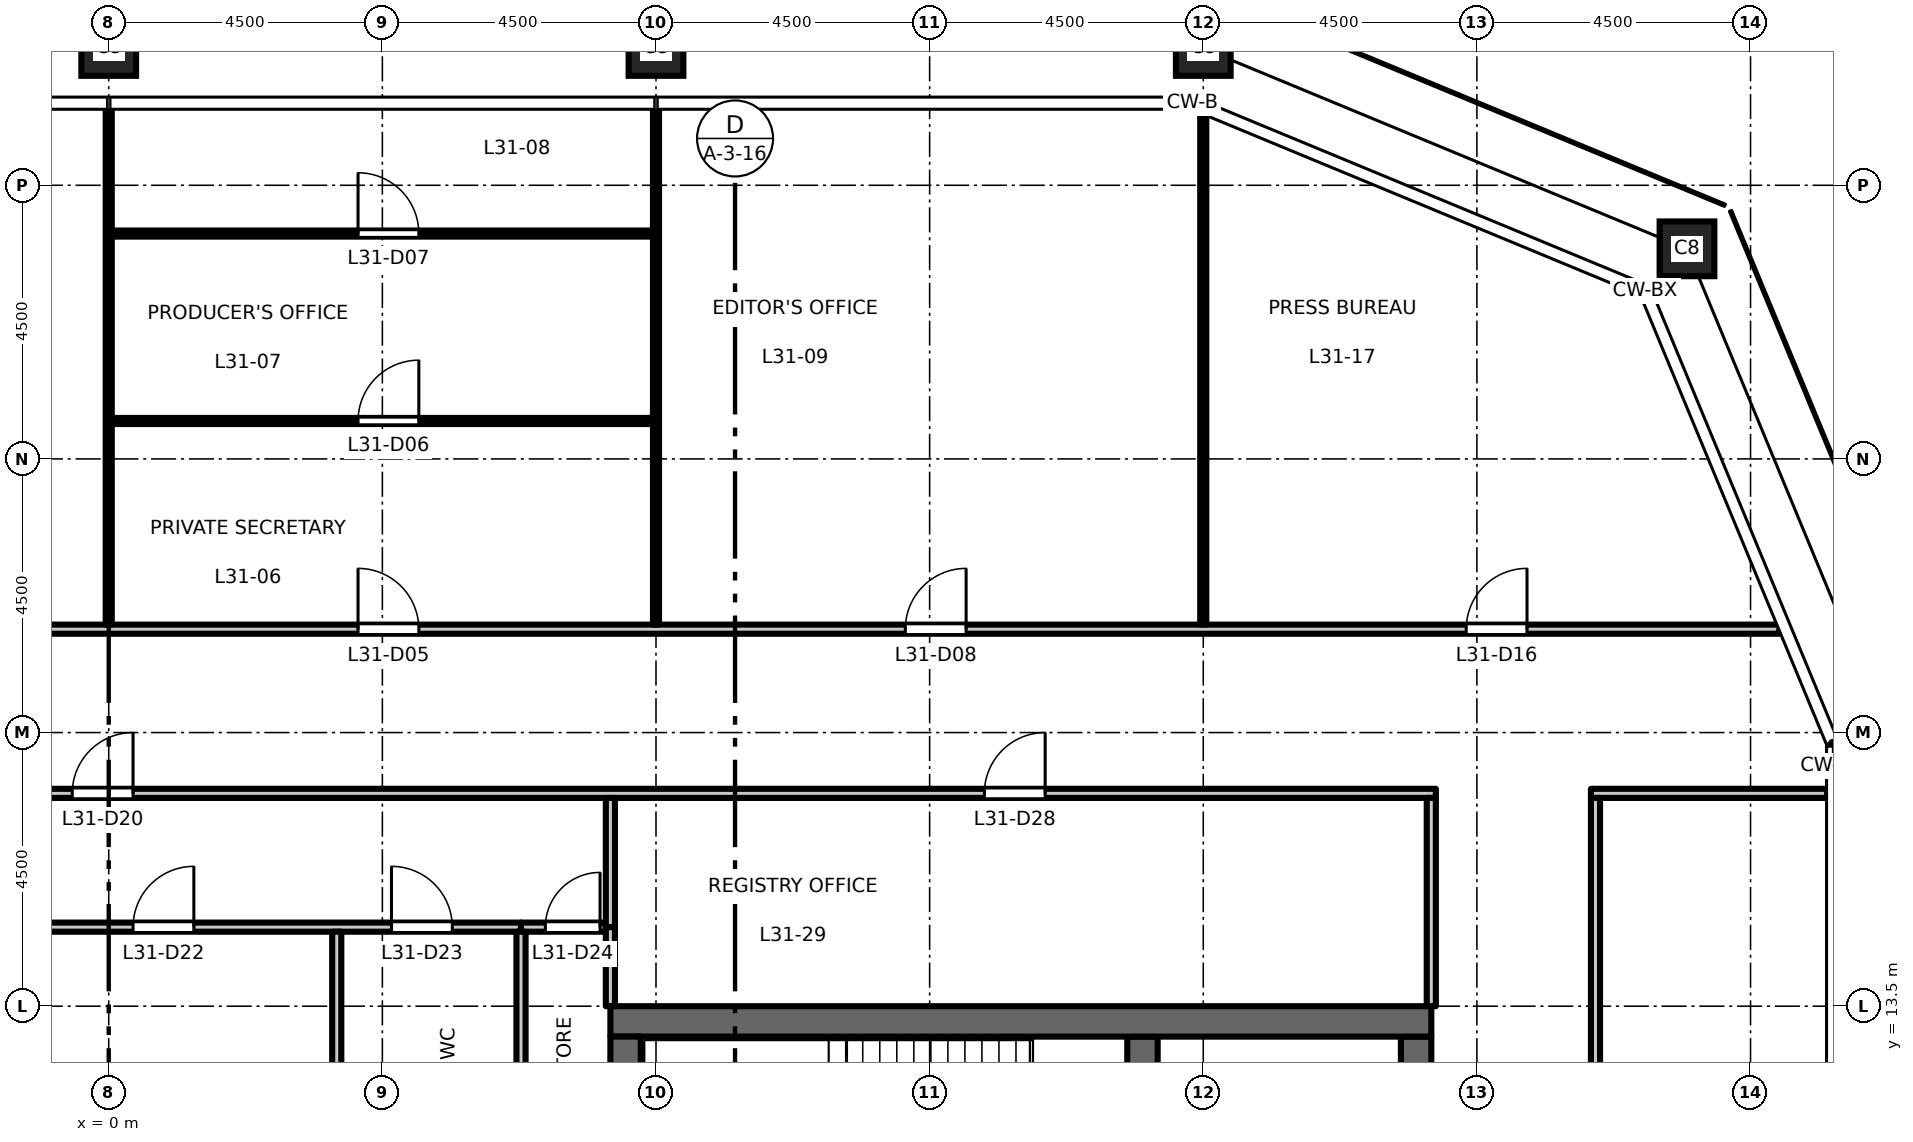
"""IFC4 building model, lengths in metres.
Left out: names, types, materials, properties, quantities, classifications, styles, units other than length and angle.
Written with IfcOpenShell. Run it as: python <this file> out.ifc"""

import sys

from ifc_helpers import new_model, si_unit, direction, frame, frame_2d, origin, origin_2d, place, context, subcontext, project, spatial, rectangle, hollow_rectangle, extrude, element, fill, save


model = new_model("IFC4")
c1 = context("Model", 3, precision=1e-05, world=origin(), true_north=direction((0.0, 1.0)))
c2 = subcontext(c1, "Body", "Model", "MODEL_VIEW")
j1 = project(units=[si_unit("LENGTHUNIT", "METRE"), si_unit("PLANEANGLEUNIT", "RADIAN")], contexts=[c1])
p1 = place(None, origin())
s1 = spatial("IfcSite", under=j1, at=p1, CompositionType="ELEMENT")
p2 = place(p1, origin())
s2 = spatial("IfcBuilding", under=s1, at=p2, CompositionType="ELEMENT")
p3 = place(p2, frame((0.0, 0.0, 145.2)))
s3 = spatial("IfcBuildingStorey", under=s2, at=p3, CompositionType="ELEMENT", Elevation=145.2)
for number, where, z_axis, x_axis in (
    (1, (25.955, 25.955, 0.0), (0.0, 0.0, 1.0), (1.0, 0.0, 0.0)),
    (2, (18.0, 29.25, 0.0), (0.0, 0.0, 1.0), (1.0, 0.0, 0.0)),
    (3, (9.0, 29.25, 0.0), (0.0, 0.0, 1.0), (1.0, 0.0, 0.0)),
    (4, (0.0, 29.25, 0.0), (0.0, 0.0, 1.0), (1.0, 0.0, 0.0)),
):
    element("IfcColumn", number, at=place(p3, frame(where, z_axis=z_axis, x_axis=x_axis)), inside=s3, PredefinedType="COLUMN", context=c2, shape_type="SweptSolid", body=[
        extrude(hollow_rectangle(XDim=0.9, YDim=0.9, WallThickness=0.05, at=origin_2d()), origin(), (0.0, 0.0, 1.0), 4.5),
    ])
p4 = place(p3, frame((21.5, -13.0, 0.0), z_axis=(0.0, 0.0, 1.0), x_axis=(0.0, 1.0, 0.0)))
e5 = element("IfcWall", 5, at=p4, inside=s3, PredefinedType="SHEAR", context=c2, shape_type="SweptSolid", body=[
    extrude(rectangle(XDim=26.0, YDim=0.5, at=frame_2d((13.0, 0.0))), origin(), (0.0, 0.0, 1.0), 4.35),
])
p5 = place(p4, frame((16.825, 0.0, 0.0)))
e6 = element("IfcOpeningElement", 6, at=p5, cuts=e5, PredefinedType="OPENING", context=c2, shape_type="SweptSolid", body=[
    extrude(rectangle(XDim=1.8, YDim=2.1, at=frame_2d((0.9, 1.05))), frame((0.0, 0.26, 0.0), z_axis=(0.0, -1.0, 0.0), x_axis=(1.0, 0.0, 0.0)), (0.0, 0.0, 1.0), 0.52),
])
p6 = place(p4, frame((7.375, 0.0, 0.0)))
e7 = element("IfcOpeningElement", 7, at=p6, cuts=e5, PredefinedType="OPENING", context=c2, shape_type="SweptSolid", body=[
    extrude(rectangle(XDim=1.8, YDim=2.1, at=frame_2d((0.9, 1.05))), frame((0.0, 0.26, 0.0), z_axis=(0.0, -1.0, 0.0), x_axis=(1.0, 0.0, 0.0)), (0.0, 0.0, 1.0), 0.52),
])
p7 = place(p4, frame((2.65, 0.0, 0.0)))
e8 = element("IfcOpeningElement", 8, at=p7, cuts=e5, PredefinedType="OPENING", context=c2, shape_type="SweptSolid", body=[
    extrude(rectangle(XDim=0.9, YDim=2.1, at=frame_2d((0.45, 1.05))), frame((0.0, 0.26, 0.0), z_axis=(0.0, -1.0, 0.0), x_axis=(1.0, 0.0, 0.0)), (0.0, 0.0, 1.0), 0.52),
])
p8 = place(p3, frame((17.0, 6.425, 0.0), z_axis=(0.0, 0.0, 1.0), x_axis=(0.0, 1.0, 0.0)))
e9 = element("IfcWall", 9, at=p8, inside=s3, PredefinedType="SHEAR", context=c2, shape_type="SweptSolid", body=[
    extrude(rectangle(XDim=6.575, YDim=0.5, at=frame_2d((3.288, 0.0))), origin(), (0.0, 0.0, 1.0), 4.35),
])
p9 = place(p3, frame((8.25, 13.25, 0.0), z_axis=(0.0, 0.0, 1.0), x_axis=(1.0, 0.0, 0.0)))
e10 = element("IfcWall", 10, at=p9, inside=s3, PredefinedType="SHEAR", context=c2, shape_type="SweptSolid", body=[
    extrude(rectangle(XDim=13.5, YDim=0.5, at=frame_2d((6.75, 0.0))), origin(), (0.0, 0.0, 1.0), 4.35),
])
p10 = place(p3, frame((8.5, -13.0, 0.0), z_axis=(0.0, 0.0, 1.0), x_axis=(0.0, 1.0, 0.0)))
e11 = element("IfcWall", 11, at=p10, inside=s3, PredefinedType="SHEAR", context=c2, shape_type="SweptSolid", body=[
    extrude(rectangle(XDim=26.0, YDim=0.5, at=frame_2d((13.0, 0.0))), origin(), (0.0, 0.0, 1.0), 4.35),
])
p11 = place(p3, frame((-8.175, 14.8, 0.0), z_axis=(0.0, 0.0, 1.0), x_axis=(1.0, 0.0, 0.0)))
e12 = element("IfcWall", 12, at=p11, inside=s3, PredefinedType="PARTITIONING", context=c2, shape_type="SweptSolid", body=[
    extrude(rectangle(XDim=14.955, YDim=0.15, at=frame_2d((7.478, 0.0))), origin(), (0.0, 0.0, 1.0), 4.35),
])
p12 = place(p11, frame((2.325, 0.0, 0.0)))
e13 = element("IfcOpeningElement", 13, at=p12, cuts=e12, PredefinedType="OPENING", context=c2, shape_type="SweptSolid", body=[
    extrude(rectangle(XDim=1.0, YDim=2.1, at=frame_2d((0.5, 1.05))), frame((0.0, 0.085, 0.0), z_axis=(0.0, -1.0, 0.0), x_axis=(1.0, 0.0, 0.0)), (0.0, 0.0, 1.0), 0.17),
])
p13 = place(p11, frame((8.575, 0.0, 0.0)))
e14 = element("IfcOpeningElement", 14, at=p13, cuts=e12, PredefinedType="OPENING", context=c2, shape_type="SweptSolid", body=[
    extrude(rectangle(XDim=1.0, YDim=2.1, at=frame_2d((0.5, 1.05))), frame((0.0, 0.085, 0.0), z_axis=(0.0, -1.0, 0.0), x_axis=(1.0, 0.0, 0.0)), (0.0, 0.0, 1.0), 0.17),
])
p14 = place(p11, frame((12.825, 0.0, 0.0)))
e15 = element("IfcOpeningElement", 15, at=p14, cuts=e12, PredefinedType="OPENING", context=c2, shape_type="SweptSolid", body=[
    extrude(rectangle(XDim=1.0, YDim=2.1, at=frame_2d((0.5, 1.05))), frame((0.0, 0.085, 0.0), z_axis=(0.0, -1.0, 0.0), x_axis=(1.0, 0.0, 0.0)), (0.0, 0.0, 1.0), 0.17),
])
p15 = place(p3, frame((6.78, 14.8, 0.0), z_axis=(0.0, 0.0, 1.0), x_axis=(1.0, 0.0, 0.0)))
e16 = element("IfcWall", 16, at=p15, inside=s3, PredefinedType="PARTITIONING", context=c2, shape_type="SweptSolid", body=[
    extrude(rectangle(XDim=1.395, YDim=0.15, at=frame_2d((0.698, 0.0))), origin(), (0.0, 0.0, 1.0), 4.35),
])
p16 = place(p15, frame((0.4, 0.0, 0.0)))
e17 = element("IfcOpeningElement", 17, at=p16, cuts=e16, PredefinedType="OPENING", context=c2, shape_type="SweptSolid", body=[
    extrude(rectangle(XDim=0.9, YDim=2.1, at=frame_2d((0.45, 1.05))), frame((0.0, 0.085, 0.0), z_axis=(0.0, -1.0, 0.0), x_axis=(1.0, 0.0, 0.0)), (0.0, 0.0, 1.0), 0.17),
])
p17 = place(p3, frame((-21.825, 17.0, 0.0), z_axis=(0.0, 0.0, 1.0), x_axis=(1.0, 0.0, 0.0)))
e18 = element("IfcWall", 18, at=p17, inside=s3, PredefinedType="PARTITIONING", context=c2, shape_type="SweptSolid", body=[
    extrude(rectangle(XDim=43.65, YDim=0.15, at=frame_2d((21.825, 0.0))), origin(), (0.0, 0.0, 1.0), 4.35),
])
p18 = place(p17, frame((21.225, 0.0, 0.0)))
e19 = element("IfcOpeningElement", 19, at=p18, cuts=e18, PredefinedType="OPENING", context=c2, shape_type="SweptSolid", body=[
    extrude(rectangle(XDim=1.0, YDim=2.1, at=frame_2d((0.5, 1.05))), frame((0.0, 0.085, 0.0), z_axis=(0.0, -1.0, 0.0), x_axis=(1.0, 0.0, 0.0)), (0.0, 0.0, 1.0), 0.17),
])
p19 = place(p17, frame((6.225, 0.0, 0.0)))
e20 = element("IfcOpeningElement", 20, at=p19, cuts=e18, PredefinedType="OPENING", context=c2, shape_type="SweptSolid", body=[
    extrude(rectangle(XDim=1.0, YDim=2.1, at=frame_2d((0.5, 1.05))), frame((0.0, 0.085, 0.0), z_axis=(0.0, -1.0, 0.0), x_axis=(1.0, 0.0, 0.0)), (0.0, 0.0, 1.0), 0.17),
])
p20 = place(p17, frame((36.225, 0.0, 0.0)))
e21 = element("IfcOpeningElement", 21, at=p20, cuts=e18, PredefinedType="OPENING", context=c2, shape_type="SweptSolid", body=[
    extrude(rectangle(XDim=1.0, YDim=2.1, at=frame_2d((0.5, 1.05))), frame((0.0, 0.085, 0.0), z_axis=(0.0, -1.0, 0.0), x_axis=(1.0, 0.0, 0.0)), (0.0, 0.0, 1.0), 0.17),
])
p21 = place(p3, frame((24.375, 17.0, 0.0), z_axis=(0.0, 0.0, 1.0), x_axis=(1.0, 0.0, 0.0)))
e22 = element("IfcWall", 22, at=p21, inside=s3, PredefinedType="PARTITIONING", context=c2, shape_type="SweptSolid", body=[
    extrude(rectangle(XDim=3.885, YDim=0.15, at=frame_2d((1.942, 0.0))), origin(), (0.0, 0.0, 1.0), 4.35),
])
p22 = place(p3, frame((-27.474, 19.7, 0.0), z_axis=(0.0, 0.0, 1.0), x_axis=(1.0, 0.0, 0.0)))
e23 = element("IfcWall", 23, at=p22, inside=s3, PredefinedType="PARTITIONING", context=c2, shape_type="SweptSolid", body=[
    extrude(rectangle(XDim=54.948, YDim=0.15, at=frame_2d((27.474, 0.0))), origin(), (0.0, 0.0, 1.0), 4.35),
])
p23 = place(p22, frame((13.574, 0.0, 0.0)))
e24 = element("IfcOpeningElement", 24, at=p23, cuts=e23, PredefinedType="OPENING", context=c2, shape_type="SweptSolid", body=[
    extrude(rectangle(XDim=1.0, YDim=2.1, at=frame_2d((0.5, 1.05))), frame((0.0, 0.085, 0.0), z_axis=(0.0, -1.0, 0.0), x_axis=(1.0, 0.0, 0.0)), (0.0, 0.0, 1.0), 0.17),
])
p24 = place(p22, frame((22.574, 0.0, 0.0)))
e25 = element("IfcOpeningElement", 25, at=p24, cuts=e23, PredefinedType="OPENING", context=c2, shape_type="SweptSolid", body=[
    extrude(rectangle(XDim=1.0, YDim=2.1, at=frame_2d((0.5, 1.05))), frame((0.0, 0.085, 0.0), z_axis=(0.0, -1.0, 0.0), x_axis=(1.0, 0.0, 0.0)), (0.0, 0.0, 1.0), 0.17),
])
p25 = place(p22, frame((31.574, 0.0, 0.0)))
e26 = element("IfcOpeningElement", 26, at=p25, cuts=e23, PredefinedType="OPENING", context=c2, shape_type="SweptSolid", body=[
    extrude(rectangle(XDim=1.0, YDim=2.1, at=frame_2d((0.5, 1.05))), frame((0.0, 0.085, 0.0), z_axis=(0.0, -1.0, 0.0), x_axis=(1.0, 0.0, 0.0)), (0.0, 0.0, 1.0), 0.17),
])
p26 = place(p22, frame((40.574, 0.0, 0.0)))
e27 = element("IfcOpeningElement", 27, at=p26, cuts=e23, PredefinedType="OPENING", context=c2, shape_type="SweptSolid", body=[
    extrude(rectangle(XDim=1.0, YDim=2.1, at=frame_2d((0.5, 1.05))), frame((0.0, 0.085, 0.0), z_axis=(0.0, -1.0, 0.0), x_axis=(1.0, 0.0, 0.0)), (0.0, 0.0, 1.0), 0.17),
])
p27 = place(p22, frame((4.324, 0.0, 0.0)))
e28 = element("IfcOpeningElement", 28, at=p27, cuts=e23, PredefinedType="OPENING", context=c2, shape_type="SweptSolid", body=[
    extrude(rectangle(XDim=1.0, YDim=2.1, at=frame_2d((0.5, 1.05))), frame((0.0, 0.085, 0.0), z_axis=(0.0, -1.0, 0.0), x_axis=(1.0, 0.0, 0.0)), (0.0, 0.0, 1.0), 0.17),
])
p28 = place(p22, frame((49.798, 0.0, 0.0)))
e29 = element("IfcOpeningElement", 29, at=p28, cuts=e23, PredefinedType="OPENING", context=c2, shape_type="SweptSolid", body=[
    extrude(rectangle(XDim=1.0, YDim=2.1, at=frame_2d((0.5, 1.05))), frame((0.0, 0.085, 0.0), z_axis=(0.0, -1.0, 0.0), x_axis=(1.0, 0.0, 0.0)), (0.0, 0.0, 1.0), 0.17),
])
p29 = place(p3, frame((0.05, 23.124, 0.0), z_axis=(0.0, 0.0, 1.0), x_axis=(1.0, 0.0, 0.0)))
e30 = element("IfcWall", 30, at=p29, inside=s3, PredefinedType="PARTITIONING", context=c2, shape_type="SweptSolid", body=[
    extrude(rectangle(XDim=8.9, YDim=0.1, at=frame_2d((4.45, 0.0))), origin(), (0.0, 0.0, 1.0), 4.35),
])
p30 = place(p29, frame((4.05, 0.0, 0.0)))
e31 = element("IfcOpeningElement", 31, at=p30, cuts=e30, PredefinedType="OPENING", context=c2, shape_type="SweptSolid", body=[
    extrude(rectangle(XDim=1.0, YDim=2.1, at=frame_2d((0.5, 1.05))), frame((0.0, 0.06, 0.0), z_axis=(0.0, -1.0, 0.0), x_axis=(1.0, 0.0, 0.0)), (0.0, 0.0, 1.0), 0.12),
])
p31 = place(p3, frame((0.05, 26.206, 0.0), z_axis=(0.0, 0.0, 1.0), x_axis=(1.0, 0.0, 0.0)))
e32 = element("IfcWall", 32, at=p31, inside=s3, PredefinedType="PARTITIONING", context=c2, shape_type="SweptSolid", body=[
    extrude(rectangle(XDim=8.9, YDim=0.1, at=frame_2d((4.45, 0.0))), origin(), (0.0, 0.0, 1.0), 4.35),
])
p32 = place(p31, frame((4.05, 0.0, 0.0)))
e33 = element("IfcOpeningElement", 33, at=p32, cuts=e32, PredefinedType="OPENING", context=c2, shape_type="SweptSolid", body=[
    extrude(rectangle(XDim=1.0, YDim=2.1, at=frame_2d((0.5, 1.05))), frame((0.0, 0.06, 0.0), z_axis=(0.0, -1.0, 0.0), x_axis=(1.0, 0.0, 0.0)), (0.0, 0.0, 1.0), 0.12),
])
p33 = place(p3, frame((0.0, 19.775, 0.0), z_axis=(0.0, 0.0, 1.0), x_axis=(0.0, 1.0, 0.0)))
e34 = element("IfcWall", 34, at=p33, inside=s3, PredefinedType="PARTITIONING", context=c2, shape_type="SweptSolid", body=[
    extrude(rectangle(XDim=8.485, YDim=0.1, at=frame_2d((4.243, 0.0))), origin(), (0.0, 0.0, 1.0), 3.45),
])
p34 = place(p3, frame((3.75, 8.37, 0.0), z_axis=(0.0, 0.0, 1.0), x_axis=(0.0, 1.0, 0.0)))
e35 = element("IfcWall", 35, at=p34, inside=s3, PredefinedType="PARTITIONING", context=c2, shape_type="SweptSolid", body=[
    extrude(rectangle(XDim=6.355, YDim=0.15, at=frame_2d((3.177, 0.0))), origin(), (0.0, 0.0, 1.0), 4.35),
])
p35 = place(p3, frame((6.78, 8.087, 0.0), z_axis=(0.0, 0.0, 1.0), x_axis=(0.0, 1.0, 0.0)))
e36 = element("IfcWall", 36, at=p35, inside=s3, PredefinedType="PARTITIONING", context=c2, shape_type="SweptSolid", body=[
    extrude(rectangle(XDim=6.638, YDim=0.15, at=frame_2d((3.319, 0.0))), origin(), (0.0, 0.0, 1.0), 4.35),
])
p36 = place(p3, frame((8.25, 14.8, 0.0), z_axis=(0.0, 0.0, 1.0), x_axis=(0.0, 1.0, 0.0)))
e37 = element("IfcWall", 37, at=p36, inside=s3, PredefinedType="PARTITIONING", context=c2, shape_type="SweptSolid", body=[
    extrude(rectangle(XDim=2.125, YDim=0.15, at=frame_2d((1.062, 0.0))), origin(), (0.0, 0.0, 1.0), 4.35),
])
p37 = place(p3, frame((8.25, 13.5, 0.0), z_axis=(0.0, 0.0, 1.0), x_axis=(0.0, 1.0, 0.0)))
e38 = element("IfcWall", 38, at=p37, inside=s3, PredefinedType="PARTITIONING", context=c2, shape_type="SweptSolid", body=[
    extrude(rectangle(XDim=1.3, YDim=0.15, at=frame_2d((0.65, 0.0))), origin(), (0.0, 0.0, 1.0), 4.35),
])
p38 = place(p3, frame((9.0, 19.775, 0.0), z_axis=(0.0, 0.0, 1.0), x_axis=(0.0, 1.0, 0.0)))
e39 = element("IfcWall", 39, at=p38, inside=s3, PredefinedType="PARTITIONING", context=c2, shape_type="SweptSolid", body=[
    extrude(rectangle(XDim=8.485, YDim=0.1, at=frame_2d((4.243, 0.0))), origin(), (0.0, 0.0, 1.0), 3.45),
])
p39 = place(p3, frame((18.0, 19.775, 0.0), z_axis=(0.0, 0.0, 1.0), x_axis=(0.0, 1.0, 0.0)))
e40 = element("IfcWall", 40, at=p39, inside=s3, PredefinedType="PARTITIONING", context=c2, shape_type="SweptSolid", body=[
    extrude(rectangle(XDim=8.403, YDim=0.1, at=frame_2d((4.202, 0.0))), origin(), (0.0, 0.0, 1.0), 3.45),
])
p40 = place(p3, frame((21.75, 13.5, 0.0), z_axis=(0.0, 0.0, 1.0), x_axis=(0.0, 1.0, 0.0)))
e41 = element("IfcWall", 41, at=p40, inside=s3, PredefinedType="PARTITIONING", context=c2, shape_type="SweptSolid", body=[
    extrude(rectangle(XDim=3.425, YDim=0.15, at=frame_2d((1.712, 0.0))), origin(), (0.0, 0.0, 1.0), 4.35),
])
p41 = place(p3, frame((24.45, -16.925, 0.0), z_axis=(0.0, 0.0, 1.0), x_axis=(0.0, 1.0, 0.0)))
e42 = element("IfcWall", 42, at=p41, inside=s3, PredefinedType="PARTITIONING", context=c2, shape_type="SweptSolid", body=[
    extrude(rectangle(XDim=33.85, YDim=0.15, at=frame_2d((16.925, 0.0))), origin(), (0.0, 0.0, 1.0), 4.35),
])
p42 = place(p41, frame((16.325, 0.0, 0.0)))
e43 = element("IfcOpeningElement", 43, at=p42, cuts=e42, PredefinedType="OPENING", context=c2, shape_type="SweptSolid", body=[
    extrude(rectangle(XDim=1.0, YDim=2.1, at=frame_2d((0.5, 1.05))), frame((0.0, 0.085, 0.0), z_axis=(0.0, -1.0, 0.0), x_axis=(1.0, 0.0, 0.0)), (0.0, 0.0, 1.0), 0.17),
])
p43 = place(p25, origin())
e44 = element("IfcDoor", 44, at=p43, inside=s3, OperationType="SINGLE_SWING_LEFT", PredefinedType="DOOR", context=c2, shape_type="SweptSolid", body=[
    extrude(rectangle(XDim=1.0, YDim=2.1, at=frame_2d((0.5, 1.05))), frame((0.0, 0.025, 0.0), z_axis=(0.0, -1.0, 0.0), x_axis=(1.0, 0.0, 0.0)), (0.0, 0.0, 1.0), 0.05),
])
fill(e26, e44)
p44 = place(p30, origin())
e45 = element("IfcDoor", 45, at=p44, inside=s3, OperationType="SINGLE_SWING_RIGHT", PredefinedType="DOOR", context=c2, shape_type="SweptSolid", body=[
    extrude(rectangle(XDim=1.0, YDim=2.1, at=frame_2d((0.5, 1.05))), frame((0.0, 0.025, 0.0), z_axis=(0.0, -1.0, 0.0), x_axis=(1.0, 0.0, 0.0)), (0.0, 0.0, 1.0), 0.05),
])
fill(e31, e45)
p45 = place(p32, origin())
e46 = element("IfcDoor", 46, at=p45, inside=s3, OperationType="SINGLE_SWING_LEFT", PredefinedType="DOOR", context=c2, shape_type="SweptSolid", body=[
    extrude(rectangle(XDim=1.0, YDim=2.1, at=frame_2d((0.5, 1.05))), frame((0.0, 0.025, 0.0), z_axis=(0.0, -1.0, 0.0), x_axis=(1.0, 0.0, 0.0)), (0.0, 0.0, 1.0), 0.05),
])
fill(e33, e46)
p46 = place(p26, origin())
e47 = element("IfcDoor", 47, at=p46, inside=s3, OperationType="SINGLE_SWING_RIGHT", PredefinedType="DOOR", context=c2, shape_type="SweptSolid", body=[
    extrude(rectangle(XDim=1.0, YDim=2.1, at=frame_2d((0.5, 1.05))), frame((0.0, 0.025, 0.0), z_axis=(0.0, -1.0, 0.0), x_axis=(1.0, 0.0, 0.0)), (0.0, 0.0, 1.0), 0.05),
])
fill(e27, e47)
p47 = place(p28, origin())
e48 = element("IfcDoor", 48, at=p47, inside=s3, OperationType="SINGLE_SWING_RIGHT", PredefinedType="DOOR", context=c2, shape_type="SweptSolid", body=[
    extrude(rectangle(XDim=1.0, YDim=2.1, at=frame_2d((0.5, 1.05))), frame((0.0, 0.025, 0.0), z_axis=(0.0, -1.0, 0.0), x_axis=(1.0, 0.0, 0.0)), (0.0, 0.0, 1.0), 0.05),
])
fill(e29, e48)
p48 = place(p18, origin())
e49 = element("IfcDoor", 49, at=p48, inside=s3, OperationType="SINGLE_SWING_RIGHT", PredefinedType="DOOR", context=c2, shape_type="SweptSolid", body=[
    extrude(rectangle(XDim=1.0, YDim=2.1, at=frame_2d((0.5, 1.05))), frame((0.0, 0.025, 0.0), z_axis=(0.0, -1.0, 0.0), x_axis=(1.0, 0.0, 0.0)), (0.0, 0.0, 1.0), 0.05),
])
fill(e19, e49)
p49 = place(p13, origin())
e50 = element("IfcDoor", 50, at=p49, inside=s3, OperationType="SINGLE_SWING_RIGHT", PredefinedType="DOOR", context=c2, shape_type="SweptSolid", body=[
    extrude(rectangle(XDim=1.0, YDim=2.1, at=frame_2d((0.5, 1.05))), frame((0.0, 0.025, 0.0), z_axis=(0.0, -1.0, 0.0), x_axis=(1.0, 0.0, 0.0)), (0.0, 0.0, 1.0), 0.05),
])
fill(e14, e50)
p50 = place(p14, origin())
e51 = element("IfcDoor", 51, at=p50, inside=s3, OperationType="SINGLE_SWING_LEFT", PredefinedType="DOOR", context=c2, shape_type="SweptSolid", body=[
    extrude(rectangle(XDim=1.0, YDim=2.1, at=frame_2d((0.5, 1.05))), frame((0.0, 0.025, 0.0), z_axis=(0.0, -1.0, 0.0), x_axis=(1.0, 0.0, 0.0)), (0.0, 0.0, 1.0), 0.05),
])
fill(e15, e51)
p51 = place(p16, origin())
e52 = element("IfcDoor", 52, at=p51, inside=s3, OperationType="SINGLE_SWING_RIGHT", PredefinedType="DOOR", context=c2, shape_type="SweptSolid", body=[
    extrude(rectangle(XDim=0.9, YDim=2.1, at=frame_2d((0.45, 1.05))), frame((0.0, 0.025, 0.0), z_axis=(0.0, -1.0, 0.0), x_axis=(1.0, 0.0, 0.0)), (0.0, 0.0, 1.0), 0.05),
])
fill(e17, e52)
p52 = place(p20, origin())
e53 = element("IfcDoor", 53, at=p52, inside=s3, OperationType="SINGLE_SWING_RIGHT", PredefinedType="DOOR", context=c2, shape_type="SweptSolid", body=[
    extrude(rectangle(XDim=1.0, YDim=2.1, at=frame_2d((0.5, 1.05))), frame((0.0, 0.025, 0.0), z_axis=(0.0, -1.0, 0.0), x_axis=(1.0, 0.0, 0.0)), (0.0, 0.0, 1.0), 0.05),
])
fill(e21, e53)
save(model, sys.argv[1])
